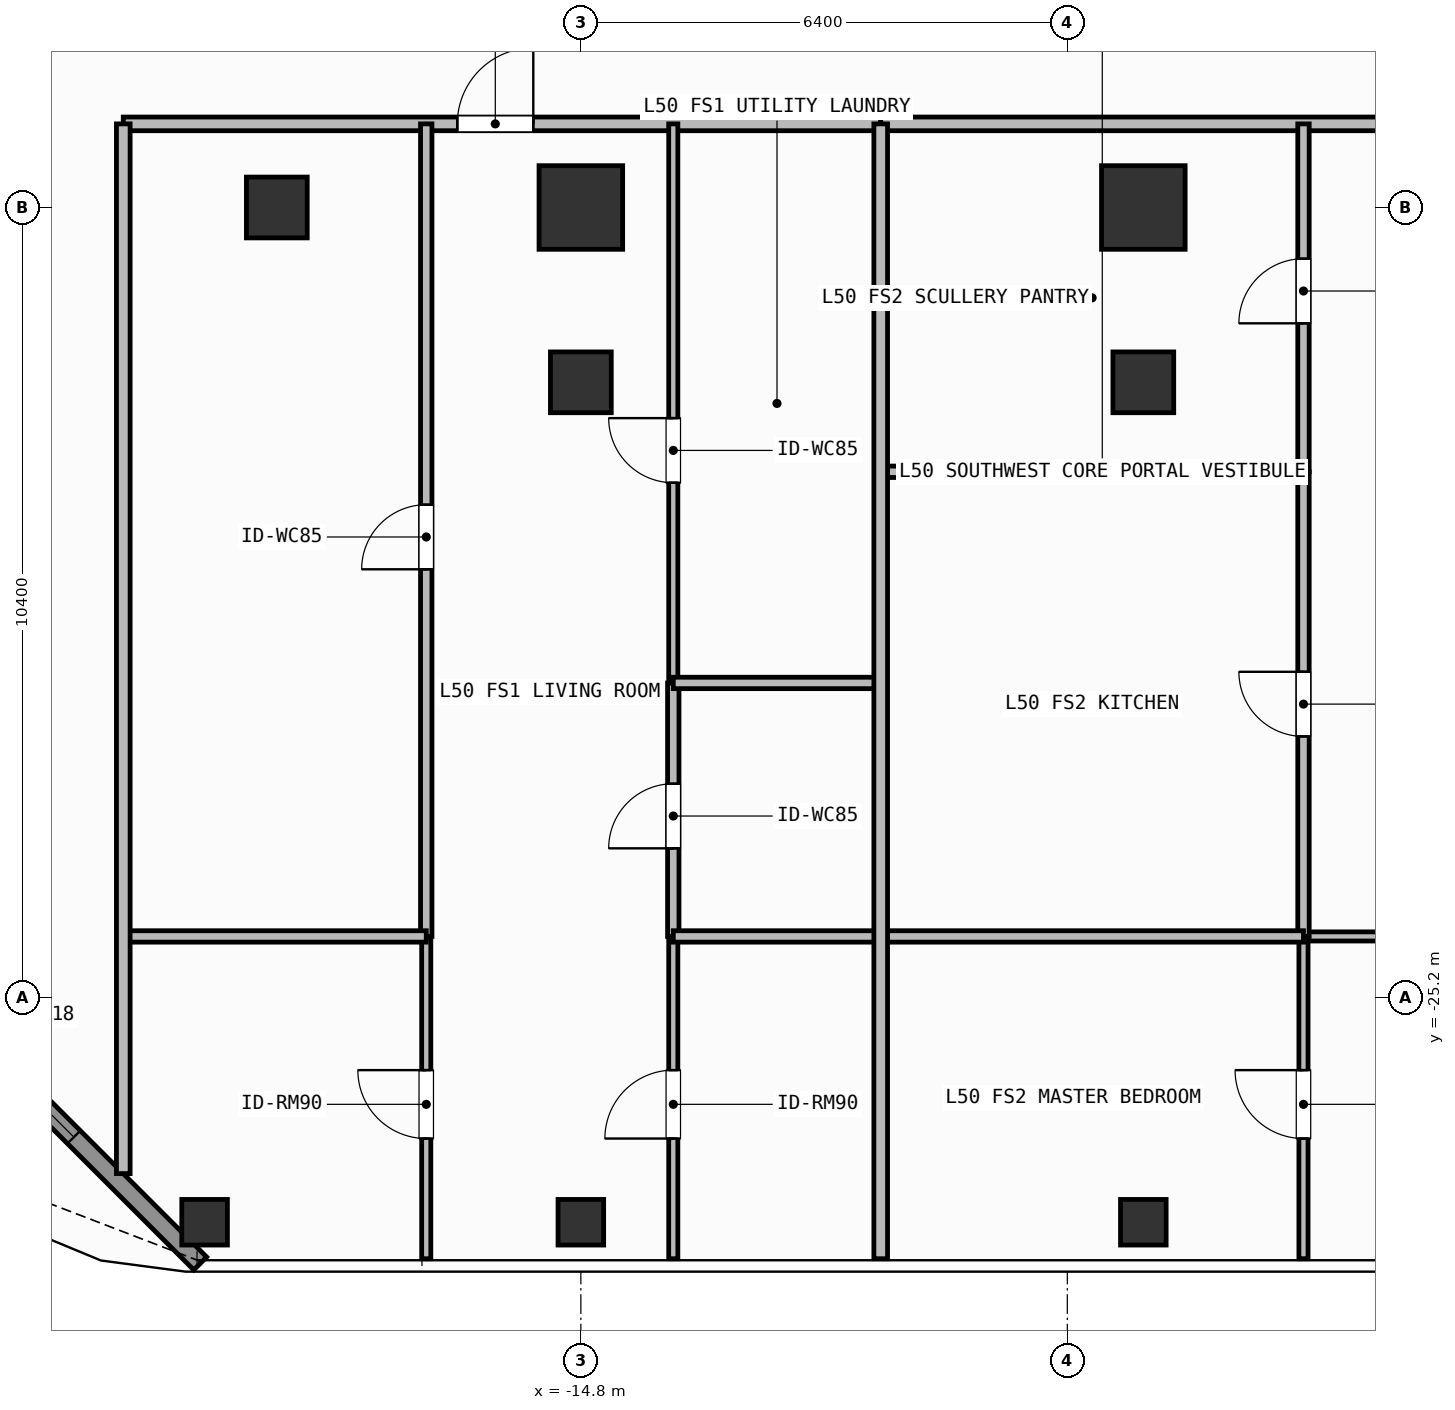
"""IFC4 building model, lengths in metres.
Left out: names, types, materials, properties, quantities, classifications, styles, units other than length and angle.
Written with IfcOpenShell. Run it as: python <this file> out.ifc"""

import sys

from ifc_helpers import new_model, si_unit, direction, frame, frame_2d, origin, origin_2d, place, context, subcontext, project, spatial, rectangle, hollow_rectangle, extrude, element, fill, save


model = new_model("IFC4")
c1 = context("Model", 3, precision=1e-05, world=origin(), true_north=direction((0.0, 1.0)))
c2 = subcontext(c1, "Body", "Model", "MODEL_VIEW")
j1 = project(units=[si_unit("LENGTHUNIT", "METRE"), si_unit("PLANEANGLEUNIT", "RADIAN")], contexts=[c1])
p1 = place(None, origin())
s1 = spatial("IfcSite", under=j1, at=p1, CompositionType="ELEMENT")
p2 = place(p1, origin())
s2 = spatial("IfcBuilding", under=s1, at=p2, CompositionType="ELEMENT")
p3 = place(p2, frame((0.0, 0.0, 203.1)))
s3 = spatial("IfcBuildingStorey", under=s2, at=p3, CompositionType="ELEMENT", Elevation=203.1)
for number, where, z_axis, x_axis in (
    (1, (-14.8, -14.8, 0.0), (0.0, 0.0, 1.0), (1.0, 0.0, 0.0)),
    (2, (-7.4, -14.8, 0.0), (0.0, 0.0, 1.0), (1.0, 0.0, 0.0)),
):
    element("IfcColumn", number, at=place(p3, frame(where, z_axis=z_axis, x_axis=x_axis)), inside=s3, PredefinedType="COLUMN", context=c2, shape_type="SweptSolid", body=[
        extrude(rectangle(XDim=1.1, YDim=1.1, at=origin_2d()), origin(), (0.0, 0.0, 1.0), 3.9),
    ])
for number, where, z_axis, x_axis in (
    (3, (-18.8, -14.8, 0.0), (0.0, 0.0, 1.0), (1.0, 0.0, 0.0)),
    (4, (-14.8, -17.1, 0.0), (0.0, 0.0, 1.0), (1.0, 0.0, 0.0)),
    (5, (-7.4, -17.1, 0.0), (0.0, 0.0, 1.0), (1.0, 0.0, 0.0)),
):
    element("IfcColumn", number, at=place(p3, frame(where, z_axis=z_axis, x_axis=x_axis)), inside=s3, PredefinedType="COLUMN", context=c2, shape_type="SweptSolid", body=[
        extrude(hollow_rectangle(XDim=0.8, YDim=0.8, WallThickness=0.036, at=origin_2d()), origin(), (0.0, 0.0, 1.0), 3.9),
    ])
for number, where, z_axis, x_axis in (
    (6, (-19.75, -28.15, 0.0), (0.0, 0.0, 1.0), (1.0, 0.0, 0.0)),
    (7, (-14.8, -28.15, 0.0), (0.0, 0.0, 1.0), (1.0, 0.0, 0.0)),
    (8, (-7.4, -28.15, 0.0), (0.0, 0.0, 1.0), (1.0, 0.0, 0.0)),
):
    element("IfcColumn", number, at=place(p3, frame(where, z_axis=z_axis, x_axis=x_axis)), inside=s3, PredefinedType="COLUMN", context=c2, shape_type="SweptSolid", body=[
        extrude(hollow_rectangle(XDim=0.6, YDim=0.6, WallThickness=0.028, at=origin_2d()), origin(), (0.0, 0.0, 1.0), 3.9),
    ])
p4 = place(p3, frame((-19.808, -28.692, 0.0), z_axis=(0.0, 0.0, 1.0), x_axis=(-0.707106781187, 0.707106781187, 0.0)))
e9 = element("IfcWall", 9, at=p4, inside=s3, PredefinedType="SOLIDWALL", context=c2, shape_type="SweptSolid", body=[
    extrude(rectangle(XDim=6.201, YDim=0.24, at=frame_2d((3.101, 0.0))), origin(), (0.0, 0.0, 1.0), 3.68),
])
p5 = place(p4, frame((2.351, 0.0, 0.8)))
e10 = element("IfcOpeningElement", 10, at=p5, cuts=e9, PredefinedType="OPENING", context=c2, shape_type="SweptSolid", body=[
    extrude(rectangle(XDim=1.5, YDim=1.85, at=frame_2d((0.75, 0.925))), frame((0.0, 0.13, 0.0), z_axis=(0.0, -1.0, 0.0), x_axis=(1.0, 0.0, 0.0)), (0.0, 0.0, 1.0), 0.26),
])
p6 = place(p3, frame((-20.82, -13.7, 0.0), z_axis=(0.0, 0.0, 1.0), x_axis=(1.0, 0.0, 0.0)))
e11 = element("IfcWall", 11, at=p6, inside=s3, PredefinedType="PARTITIONING", context=c2, shape_type="SweptSolid", body=[
    extrude(rectangle(XDim=9.965, YDim=0.18, at=frame_2d((4.982, 0.0))), origin(), (0.0, 0.0, 1.0), 3.68),
])
p7 = place(p6, frame((4.394, 0.0, 0.0)))
e12 = element("IfcOpeningElement", 12, at=p7, cuts=e11, PredefinedType="OPENING", context=c2, shape_type="SweptSolid", body=[
    extrude(rectangle(XDim=1.0, YDim=2.2, at=frame_2d((0.5, 1.1))), frame((0.0, 0.1, 0.0), z_axis=(0.0, -1.0, 0.0), x_axis=(1.0, 0.0, 0.0)), (0.0, 0.0, 1.0), 0.2),
])
p8 = place(p3, frame((-16.834, -24.39, 0.0), z_axis=(0.0, 0.0, 1.0), x_axis=(0.0, 1.0, 0.0)))
e13 = element("IfcWall", 13, at=p8, inside=s3, PredefinedType="PARTITIONING", context=c2, shape_type="SweptSolid", body=[
    extrude(rectangle(XDim=10.69, YDim=0.15, at=frame_2d((5.345, 0.0))), origin(), (0.0, 0.0, 1.0), 3.68),
])
p9 = place(p8, frame((4.83, 0.0, 0.0)))
e14 = element("IfcOpeningElement", 14, at=p9, cuts=e13, PredefinedType="OPENING", context=c2, shape_type="SweptSolid", body=[
    extrude(rectangle(XDim=0.85, YDim=2.1, at=frame_2d((0.425, 1.05))), frame((0.0, 0.085, 0.0), z_axis=(0.0, -1.0, 0.0), x_axis=(1.0, 0.0, 0.0)), (0.0, 0.0, 1.0), 0.17),
])
p10 = place(p3, frame((-16.834, -28.63, 0.0), z_axis=(0.0, 0.0, 1.0), x_axis=(0.0, 1.0, 0.0)))
e15 = element("IfcWall", 15, at=p10, inside=s3, PredefinedType="PARTITIONING", context=c2, shape_type="SweptSolid", body=[
    extrude(rectangle(XDim=4.24, YDim=0.12, at=frame_2d((2.12, 0.0))), origin(), (0.0, 0.0, 1.0), 3.68),
])
p11 = place(p10, frame((1.581, 0.0, 0.0)))
e16 = element("IfcOpeningElement", 16, at=p11, cuts=e15, PredefinedType="OPENING", context=c2, shape_type="SweptSolid", body=[
    extrude(rectangle(XDim=0.9, YDim=2.1, at=frame_2d((0.45, 1.05))), frame((0.0, 0.07, 0.0), z_axis=(0.0, -1.0, 0.0), x_axis=(1.0, 0.0, 0.0)), (0.0, 0.0, 1.0), 0.14),
])
p12 = place(p3, frame((-13.584, -24.39, 0.0), z_axis=(0.0, 0.0, 1.0), x_axis=(0.0, 1.0, 0.0)))
e17 = element("IfcWall", 17, at=p12, inside=s3, PredefinedType="PARTITIONING", context=c2, shape_type="SweptSolid", body=[
    extrude(rectangle(XDim=3.335, YDim=0.15, at=frame_2d((1.667, 0.0))), origin(), (0.0, 0.0, 1.0), 3.68),
])
p13 = place(p12, frame((1.159, 0.0, 0.0)))
e18 = element("IfcOpeningElement", 18, at=p13, cuts=e17, PredefinedType="OPENING", context=c2, shape_type="SweptSolid", body=[
    extrude(rectangle(XDim=0.85, YDim=2.1, at=frame_2d((0.425, 1.05))), frame((0.0, 0.085, 0.0), z_axis=(0.0, -1.0, 0.0), x_axis=(1.0, 0.0, 0.0)), (0.0, 0.0, 1.0), 0.17),
])
p14 = place(p3, frame((-13.584, -21.055, 0.0), z_axis=(0.0, 0.0, 1.0), x_axis=(0.0, 1.0, 0.0)))
e19 = element("IfcWall", 19, at=p14, inside=s3, PredefinedType="PARTITIONING", context=c2, shape_type="SweptSolid", body=[
    extrude(rectangle(XDim=7.355, YDim=0.12, at=frame_2d((3.677, 0.0))), origin(), (0.0, 0.0, 1.0), 3.68),
])
p15 = place(p14, frame((2.634, 0.0, 0.0)))
e20 = element("IfcOpeningElement", 20, at=p15, cuts=e19, PredefinedType="OPENING", context=c2, shape_type="SweptSolid", body=[
    extrude(rectangle(XDim=0.85, YDim=2.1, at=frame_2d((0.425, 1.05))), frame((0.0, 0.07, 0.0), z_axis=(0.0, -1.0, 0.0), x_axis=(1.0, 0.0, 0.0)), (0.0, 0.0, 1.0), 0.14),
])
p16 = place(p3, frame((-13.584, -28.63, 0.0), z_axis=(0.0, 0.0, 1.0), x_axis=(0.0, 1.0, 0.0)))
e21 = element("IfcWall", 21, at=p16, inside=s3, PredefinedType="PARTITIONING", context=c2, shape_type="SweptSolid", body=[
    extrude(rectangle(XDim=4.24, YDim=0.12, at=frame_2d((2.12, 0.0))), origin(), (0.0, 0.0, 1.0), 3.68),
])
p17 = place(p16, frame((1.581, 0.0, 0.0)))
e22 = element("IfcOpeningElement", 22, at=p17, cuts=e21, PredefinedType="OPENING", context=c2, shape_type="SweptSolid", body=[
    extrude(rectangle(XDim=0.9, YDim=2.1, at=frame_2d((0.45, 1.05))), frame((0.0, 0.07, 0.0), z_axis=(0.0, -1.0, 0.0), x_axis=(1.0, 0.0, 0.0)), (0.0, 0.0, 1.0), 0.14),
])
p18 = place(p3, frame((-10.855, -13.7, 0.0), z_axis=(0.0, 0.0, 1.0), x_axis=(1.0, 0.0, 0.0)))
e23 = element("IfcWall", 23, at=p18, inside=s3, PredefinedType="PARTITIONING", context=c2, shape_type="SweptSolid", body=[
    extrude(rectangle(XDim=16.454, YDim=0.18, at=frame_2d((8.227, 0.0))), origin(), (0.0, 0.0, 1.0), 3.68),
])
p19 = place(p18, frame((8.528, 0.0, 0.0)))
e24 = element("IfcOpeningElement", 24, at=p19, cuts=e23, PredefinedType="OPENING", context=c2, shape_type="SweptSolid", body=[
    extrude(rectangle(XDim=1.0, YDim=2.2, at=frame_2d((0.5, 1.1))), frame((0.0, 0.1, 0.0), z_axis=(0.0, -1.0, 0.0), x_axis=(1.0, 0.0, 0.0)), (0.0, 0.0, 1.0), 0.2),
])
p20 = place(p3, frame((-5.293, -24.39, 0.0), z_axis=(0.0, 0.0, 1.0), x_axis=(1.0, 0.0, 0.0)))
e25 = element("IfcWall", 25, at=p20, inside=s3, PredefinedType="PARTITIONING", context=c2, shape_type="SweptSolid", body=[
    extrude(rectangle(XDim=7.248, YDim=0.12, at=frame_2d((3.624, 0.0))), origin(), (0.0, 0.0, 1.0), 3.68),
])
p21 = place(p20, frame((3.174, 0.0, 0.0)))
e26 = element("IfcOpeningElement", 26, at=p21, cuts=e25, PredefinedType="OPENING", context=c2, shape_type="SweptSolid", body=[
    extrude(rectangle(XDim=0.9, YDim=2.1, at=frame_2d((0.45, 1.05))), frame((0.0, 0.07, 0.0), z_axis=(0.0, -1.0, 0.0), x_axis=(1.0, 0.0, 0.0)), (0.0, 0.0, 1.0), 0.14),
])
p22 = place(p3, frame((-5.293, -24.39, 0.0), z_axis=(0.0, 0.0, 1.0), x_axis=(0.0, 1.0, 0.0)))
e27 = element("IfcWall", 27, at=p22, inside=s3, PredefinedType="PARTITIONING", context=c2, shape_type="SweptSolid", body=[
    extrude(rectangle(XDim=6.113, YDim=0.15, at=frame_2d((3.056, 0.0))), origin(), (0.0, 0.0, 1.0), 3.68),
])
p23 = place(p22, frame((2.632, 0.0, 0.0)))
e28 = element("IfcOpeningElement", 28, at=p23, cuts=e27, PredefinedType="OPENING", context=c2, shape_type="SweptSolid", body=[
    extrude(rectangle(XDim=0.85, YDim=2.1, at=frame_2d((0.425, 1.05))), frame((0.0, 0.085, 0.0), z_axis=(0.0, -1.0, 0.0), x_axis=(1.0, 0.0, 0.0)), (0.0, 0.0, 1.0), 0.17),
])
p24 = place(p3, frame((-5.293, -18.277, 0.0), z_axis=(0.0, 0.0, 1.0), x_axis=(0.0, 1.0, 0.0)))
e29 = element("IfcWall", 29, at=p24, inside=s3, PredefinedType="PARTITIONING", context=c2, shape_type="SweptSolid", body=[
    extrude(rectangle(XDim=4.577, YDim=0.15, at=frame_2d((2.289, 0.0))), origin(), (0.0, 0.0, 1.0), 3.68),
])
p25 = place(p24, frame((1.953, 0.0, 0.0)))
e30 = element("IfcOpeningElement", 30, at=p25, cuts=e29, PredefinedType="OPENING", context=c2, shape_type="SweptSolid", body=[
    extrude(rectangle(XDim=0.85, YDim=2.1, at=frame_2d((0.425, 1.05))), frame((0.0, 0.085, 0.0), z_axis=(0.0, -1.0, 0.0), x_axis=(1.0, 0.0, 0.0)), (0.0, 0.0, 1.0), 0.17),
])
p26 = place(p3, frame((-5.293, -28.63, 0.0), z_axis=(0.0, 0.0, 1.0), x_axis=(0.0, 1.0, 0.0)))
e31 = element("IfcWall", 31, at=p26, inside=s3, PredefinedType="PARTITIONING", context=c2, shape_type="SweptSolid", body=[
    extrude(rectangle(XDim=4.24, YDim=0.12, at=frame_2d((2.12, 0.0))), origin(), (0.0, 0.0, 1.0), 3.68),
])
p27 = place(p26, frame((1.581, 0.0, 0.0)))
e32 = element("IfcOpeningElement", 32, at=p27, cuts=e31, PredefinedType="OPENING", context=c2, shape_type="SweptSolid", body=[
    extrude(rectangle(XDim=0.9, YDim=2.1, at=frame_2d((0.45, 1.05))), frame((0.0, 0.07, 0.0), z_axis=(0.0, -1.0, 0.0), x_axis=(1.0, 0.0, 0.0)), (0.0, 0.0, 1.0), 0.14),
])
p28 = place(p3, frame((-20.82, -24.39, 0.0), z_axis=(0.0, 0.0, 1.0), x_axis=(1.0, 0.0, 0.0)))
e33 = element("IfcWall", 33, at=p28, inside=s3, PredefinedType="PARTITIONING", context=c2, shape_type="SweptSolid", body=[
    extrude(rectangle(XDim=3.986, YDim=0.15, at=frame_2d((1.993, 0.0))), origin(), (0.0, 0.0, 1.0), 3.68),
])
for number, where, z_axis, x_axis in (
    (34, (-13.584, -21.055, 0.0), (0.0, 0.0, 1.0), (1.0, 0.0, 0.0)),
    (35, (-13.584, -24.39, 0.0), (0.0, 0.0, 1.0), (1.0, 0.0, 0.0)),
):
    element("IfcWall", number, at=place(p3, frame(where, z_axis=z_axis, x_axis=x_axis)), inside=s3, PredefinedType="PARTITIONING", context=c2, shape_type="SweptSolid", body=[
        extrude(rectangle(XDim=2.729, YDim=0.15, at=frame_2d((1.365, 0.0))), origin(), (0.0, 0.0, 1.0), 3.68),
    ])
for number, where, z_axis, x_axis in (
    (36, (-10.855, -18.277, 0.0), (0.0, 0.0, 1.0), (1.0, 0.0, 0.0)),
    (37, (-10.855, -24.39, 0.0), (0.0, 0.0, 1.0), (1.0, 0.0, 0.0)),
):
    element("IfcWall", number, at=place(p3, frame(where, z_axis=z_axis, x_axis=x_axis)), inside=s3, PredefinedType="PARTITIONING", context=c2, shape_type="SweptSolid", body=[
        extrude(rectangle(XDim=5.562, YDim=0.15, at=frame_2d((2.781, 0.0))), origin(), (0.0, 0.0, 1.0), 3.68),
    ])
p29 = place(p3, frame((-10.855, -28.63, 0.0), z_axis=(0.0, 0.0, 1.0), x_axis=(0.0, 1.0, 0.0)))
e38 = element("IfcWall", 38, at=p29, inside=s3, PredefinedType="PARTITIONING", context=c2, shape_type="SweptSolid", body=[
    extrude(rectangle(XDim=14.93, YDim=0.18, at=frame_2d((7.465, 0.0))), origin(), (0.0, 0.0, 1.0), 3.68),
])
p30 = place(p3, frame((-20.82, -27.51, 0.0), z_axis=(0.0, 0.0, 1.0), x_axis=(0.0, 1.0, 0.0)))
e39 = element("IfcWall", 39, at=p30, inside=s3, PredefinedType="PARTITIONING", context=c2, shape_type="SweptSolid", body=[
    extrude(rectangle(XDim=13.81, YDim=0.18, at=frame_2d((6.905, 0.0))), origin(), (0.0, 0.0, 1.0), 3.68),
])
p31 = place(p5, origin())
e40 = element("IfcWindow", 40, at=p31, inside=s3, PartitioningType="SINGLE_PANEL", PredefinedType="WINDOW", context=c2, shape_type="SweptSolid", body=[
    extrude(rectangle(XDim=1.5, YDim=1.85, at=frame_2d((0.75, 0.925))), frame((0.0, 0.03, 0.0), z_axis=(0.0, -1.0, 0.0), x_axis=(1.0, 0.0, 0.0)), (0.0, 0.0, 1.0), 0.06),
])
fill(e10, e40)
p32 = place(p7, origin())
e41 = element("IfcDoor", 41, at=p32, inside=s3, OperationType="SINGLE_SWING_RIGHT", PredefinedType="DOOR", context=c2, shape_type="SweptSolid", body=[
    extrude(rectangle(XDim=1.0, YDim=2.2, at=frame_2d((0.5, 1.1))), frame((0.0, 0.025, 0.0), z_axis=(0.0, -1.0, 0.0), x_axis=(1.0, 0.0, 0.0)), (0.0, 0.0, 1.0), 0.05),
])
fill(e12, e41)
p33 = place(p9, origin())
e42 = element("IfcDoor", 42, at=p33, inside=s3, OperationType="SINGLE_SWING_LEFT", PredefinedType="DOOR", context=c2, shape_type="SweptSolid", body=[
    extrude(rectangle(XDim=0.85, YDim=2.1, at=frame_2d((0.425, 1.05))), frame((0.0, 0.025, 0.0), z_axis=(0.0, -1.0, 0.0), x_axis=(1.0, 0.0, 0.0)), (0.0, 0.0, 1.0), 0.05),
])
fill(e14, e42)
p34 = place(p11, origin())
e43 = element("IfcDoor", 43, at=p34, inside=s3, OperationType="SINGLE_SWING_RIGHT", PredefinedType="DOOR", context=c2, shape_type="SweptSolid", body=[
    extrude(rectangle(XDim=0.9, YDim=2.1, at=frame_2d((0.45, 1.05))), frame((0.0, 0.025, 0.0), z_axis=(0.0, -1.0, 0.0), x_axis=(1.0, 0.0, 0.0)), (0.0, 0.0, 1.0), 0.05),
])
fill(e16, e43)
p35 = place(p13, origin())
e44 = element("IfcDoor", 44, at=p35, inside=s3, OperationType="SINGLE_SWING_LEFT", PredefinedType="DOOR", context=c2, shape_type="SweptSolid", body=[
    extrude(rectangle(XDim=0.85, YDim=2.1, at=frame_2d((0.425, 1.05))), frame((0.0, 0.025, 0.0), z_axis=(0.0, -1.0, 0.0), x_axis=(1.0, 0.0, 0.0)), (0.0, 0.0, 1.0), 0.05),
])
fill(e18, e44)
p36 = place(p15, origin())
e45 = element("IfcDoor", 45, at=p36, inside=s3, OperationType="SINGLE_SWING_RIGHT", PredefinedType="DOOR", context=c2, shape_type="SweptSolid", body=[
    extrude(rectangle(XDim=0.85, YDim=2.1, at=frame_2d((0.425, 1.05))), frame((0.0, 0.025, 0.0), z_axis=(0.0, -1.0, 0.0), x_axis=(1.0, 0.0, 0.0)), (0.0, 0.0, 1.0), 0.05),
])
fill(e20, e45)
p37 = place(p17, origin())
e46 = element("IfcDoor", 46, at=p37, inside=s3, OperationType="SINGLE_SWING_LEFT", PredefinedType="DOOR", context=c2, shape_type="SweptSolid", body=[
    extrude(rectangle(XDim=0.9, YDim=2.1, at=frame_2d((0.45, 1.05))), frame((0.0, 0.025, 0.0), z_axis=(0.0, -1.0, 0.0), x_axis=(1.0, 0.0, 0.0)), (0.0, 0.0, 1.0), 0.05),
])
fill(e22, e46)
p38 = place(p23, origin())
e47 = element("IfcDoor", 47, at=p38, inside=s3, OperationType="SINGLE_SWING_RIGHT", PredefinedType="DOOR", context=c2, shape_type="SweptSolid", body=[
    extrude(rectangle(XDim=0.85, YDim=2.1, at=frame_2d((0.425, 1.05))), frame((0.0, 0.025, 0.0), z_axis=(0.0, -1.0, 0.0), x_axis=(1.0, 0.0, 0.0)), (0.0, 0.0, 1.0), 0.05),
])
fill(e28, e47)
p39 = place(p25, origin())
e48 = element("IfcDoor", 48, at=p39, inside=s3, OperationType="SINGLE_SWING_LEFT", PredefinedType="DOOR", context=c2, shape_type="SweptSolid", body=[
    extrude(rectangle(XDim=0.85, YDim=2.1, at=frame_2d((0.425, 1.05))), frame((0.0, 0.025, 0.0), z_axis=(0.0, -1.0, 0.0), x_axis=(1.0, 0.0, 0.0)), (0.0, 0.0, 1.0), 0.05),
])
fill(e30, e48)
p40 = place(p27, origin())
e49 = element("IfcDoor", 49, at=p40, inside=s3, OperationType="SINGLE_SWING_RIGHT", PredefinedType="DOOR", context=c2, shape_type="SweptSolid", body=[
    extrude(rectangle(XDim=0.9, YDim=2.1, at=frame_2d((0.45, 1.05))), frame((0.0, 0.025, 0.0), z_axis=(0.0, -1.0, 0.0), x_axis=(1.0, 0.0, 0.0)), (0.0, 0.0, 1.0), 0.05),
])
fill(e32, e49)
save(model, sys.argv[1])
